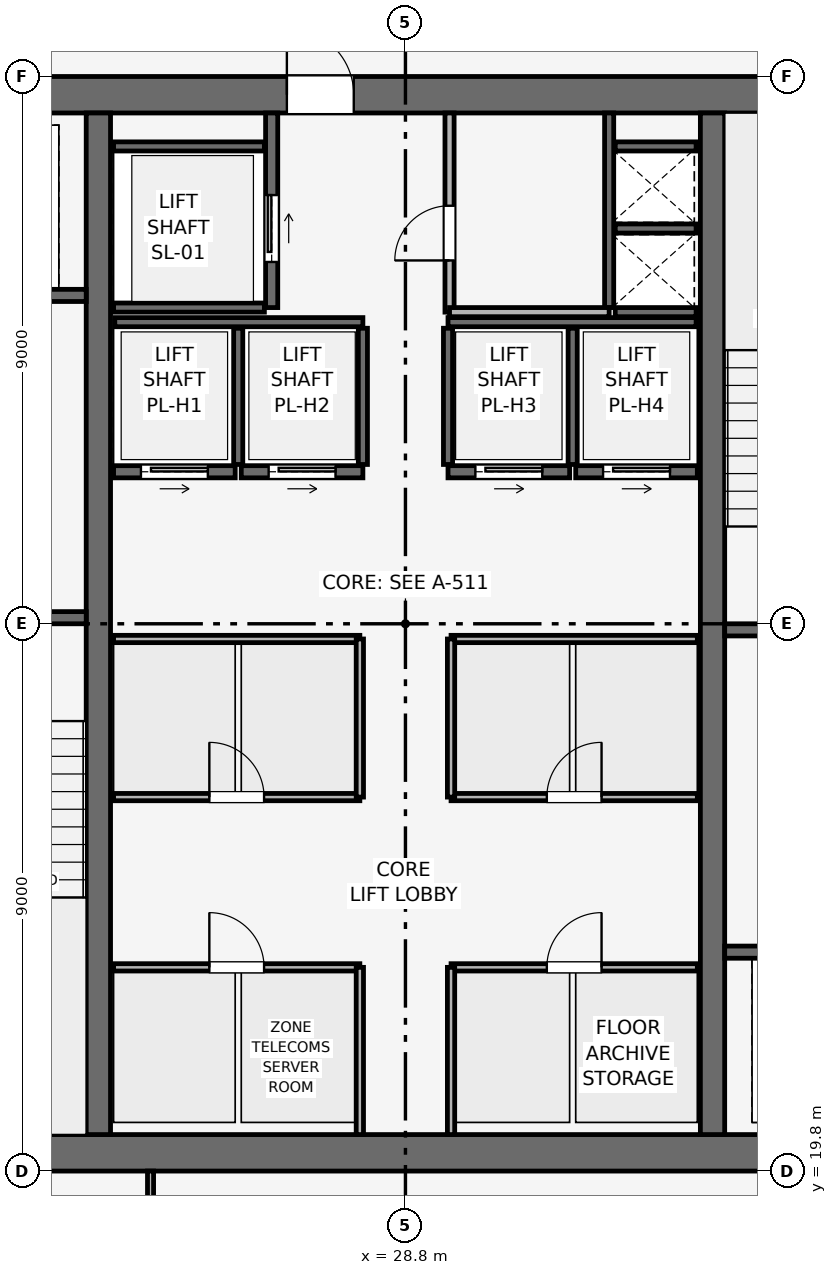
"""IFC4 building model, lengths in metres.
Left out: names, types, materials, properties, quantities, classifications, styles, units other than length and angle.
Written with IfcOpenShell. Run it as: python <this file> out.ifc"""

import sys

from ifc_helpers import new_model, si_unit, direction, frame, frame_2d, origin, place, context, subcontext, project, spatial, rectangle, extrude, element, fill, save


model = new_model("IFC4")
c1 = context("Model", 3, precision=1e-05, world=origin(), true_north=direction((0.0, 1.0)))
c2 = subcontext(c1, "Body", "Model", "MODEL_VIEW")
j1 = project(units=[si_unit("LENGTHUNIT", "METRE"), si_unit("PLANEANGLEUNIT", "RADIAN")], contexts=[c1])
p1 = place(None, origin())
s1 = spatial("IfcSite", under=j1, at=p1, CompositionType="ELEMENT")
p2 = place(p1, origin())
s2 = spatial("IfcBuilding", under=s1, at=p2, CompositionType="ELEMENT")
p3 = place(p2, frame((0.0, 0.0, 299.25)))
s3 = spatial("IfcBuildingStorey", under=s2, at=p3, CompositionType="ELEMENT", Elevation=299.25)
p4 = place(p3, frame((19.8, 20.1, 0.0), z_axis=(0.0, 0.0, 1.0), x_axis=(1.0, 0.0, 0.0)))
e1 = element("IfcWall", 1, at=p4, inside=s3, PredefinedType="SHEAR", context=c2, shape_type="SweptSolid", body=[
    extrude(rectangle(XDim=18.0, YDim=0.6, at=frame_2d((9.0, 0.0))), origin(), (0.0, 0.0, 1.0), 3.75),
])
p5 = place(p3, frame((19.8, 37.5, 0.0), z_axis=(0.0, 0.0, 1.0), x_axis=(1.0, 0.0, 0.0)))
e2 = element("IfcWall", 2, at=p5, inside=s3, PredefinedType="SHEAR", context=c2, shape_type="SweptSolid", body=[
    extrude(rectangle(XDim=18.0, YDim=0.6, at=frame_2d((9.0, 0.0))), origin(), (0.0, 0.0, 1.0), 3.75),
])
p6 = place(p5, frame((7.05, 0.0, 0.0)))
e3 = element("IfcOpeningElement", 3, at=p6, cuts=e2, PredefinedType="OPENING", context=c2, shape_type="SweptSolid", body=[
    extrude(rectangle(XDim=1.1, YDim=2.15, at=frame_2d((0.55, 1.075))), frame((0.0, 0.31, 0.0), z_axis=(0.0, -1.0, 0.0), x_axis=(1.0, 0.0, 0.0)), (0.0, 0.0, 1.0), 0.62),
])
for number, where, z_axis, x_axis in (
    (4, (23.75, 20.4, 0.0), (0.0, 0.0, 1.0), (0.0, 1.0, 0.0)),
    (5, (33.85, 20.4, 0.0), (0.0, 0.0, 1.0), (0.0, 1.0, 0.0)),
):
    element("IfcWall", number, at=place(p3, frame(where, z_axis=z_axis, x_axis=x_axis)), inside=s3, PredefinedType="SHEAR", context=c2, shape_type="SweptSolid", body=[
        extrude(rectangle(XDim=16.8, YDim=0.4, at=frame_2d((8.4, 0.0))), origin(), (0.0, 0.0, 1.0), 3.75),
    ])
p7 = place(p3, frame((20.4, 28.9, 0.0), z_axis=(0.0, 0.0, 1.0), x_axis=(1.0, 0.0, 0.0)))
e6 = element("IfcWall", 6, at=p7, inside=s3, PredefinedType="SHEAR", context=c2, shape_type="SweptSolid", body=[
    extrude(rectangle(XDim=3.15, YDim=0.2, at=frame_2d((1.575, 0.0))), origin(), (0.0, 0.0, 1.0), 3.51),
])
p8 = place(p7, frame((0.8, 0.0, 0.0)))
e7 = element("IfcOpeningElement", 7, at=p8, cuts=e6, PredefinedType="OPENING", context=c2, shape_type="SweptSolid", body=[
    extrude(rectangle(XDim=1.0, YDim=2.1, at=frame_2d((0.5, 1.05))), frame((0.0, 0.11, 0.0), z_axis=(0.0, -1.0, 0.0), x_axis=(1.0, 0.0, 0.0)), (0.0, 0.0, 1.0), 0.22),
])
p9 = place(p3, frame((34.05, 28.7, 0.0), z_axis=(0.0, 0.0, 1.0), x_axis=(1.0, 0.0, 0.0)))
e8 = element("IfcWall", 8, at=p9, inside=s3, PredefinedType="SHEAR", context=c2, shape_type="SweptSolid", body=[
    extrude(rectangle(XDim=3.15, YDim=0.2, at=frame_2d((1.575, 0.0))), origin(), (0.0, 0.0, 1.0), 3.51),
])
p10 = place(p9, frame((0.8, 0.0, 0.0)))
e9 = element("IfcOpeningElement", 9, at=p10, cuts=e8, PredefinedType="OPENING", context=c2, shape_type="SweptSolid", body=[
    extrude(rectangle(XDim=1.0, YDim=2.1, at=frame_2d((0.5, 1.05))), frame((0.0, 0.11, 0.0), z_axis=(0.0, -1.0, 0.0), x_axis=(1.0, 0.0, 0.0)), (0.0, 0.0, 1.0), 0.22),
])
p11 = place(p3, frame((32.15, 34.0, 0.0), z_axis=(0.0, 0.0, 1.0), x_axis=(0.0, 1.0, 0.0)))
e10 = element("IfcWall", 10, at=p11, inside=s3, PredefinedType="SHEAR", context=c2, shape_type="SweptSolid", body=[
    extrude(rectangle(XDim=3.2, YDim=0.15, at=frame_2d((1.6, 0.0))), origin(), (0.0, 0.0, 1.0), 3.51),
])
for number, where, z_axis, x_axis in (
    (11, (32.25, 33.925, 0.0), (0.0, 0.0, 1.0), (1.0, 0.0, 0.0)),
    (12, (32.25, 35.3, 0.0), (0.0, 0.0, 1.0), (1.0, 0.0, 0.0)),
):
    element("IfcWall", number, at=place(p3, frame(where, z_axis=z_axis, x_axis=x_axis)), inside=s3, PredefinedType="SHEAR", context=c2, shape_type="SweptSolid", body=[
        extrude(rectangle(XDim=1.33, YDim=0.15, at=frame_2d((0.665, 0.0))), origin(), (0.0, 0.0, 1.0), 3.51),
    ])
p12 = place(p3, frame((20.5, 34.2, 0.0), z_axis=(0.0, 0.0, 1.0), x_axis=(1.0, 0.0, 0.0)))
e13 = element("IfcWall", 13, at=p12, inside=s3, PredefinedType="SHEAR", context=c2, shape_type="SweptSolid", body=[
    extrude(rectangle(XDim=3.05, YDim=0.2, at=frame_2d((1.525, 0.0))), origin(), (0.0, 0.0, 1.0), 3.51),
])
p13 = place(p12, frame((0.75, 0.0, 0.0)))
e14 = element("IfcOpeningElement", 14, at=p13, cuts=e13, PredefinedType="OPENING", context=c2, shape_type="SweptSolid", body=[
    extrude(rectangle(XDim=1.1, YDim=2.15, at=frame_2d((0.55, 1.075))), frame((0.0, 0.11, 0.0), z_axis=(0.0, -1.0, 0.0), x_axis=(1.0, 0.0, 0.0)), (0.0, 0.0, 1.0), 0.22),
])
p14 = place(p3, frame((34.05, 23.4, 0.0), z_axis=(0.0, 0.0, 1.0), x_axis=(1.0, 0.0, 0.0)))
e15 = element("IfcWall", 15, at=p14, inside=s3, PredefinedType="SHEAR", context=c2, shape_type="SweptSolid", body=[
    extrude(rectangle(XDim=3.05, YDim=0.2, at=frame_2d((1.525, 0.0))), origin(), (0.0, 0.0, 1.0), 3.51),
])
p15 = place(p14, frame((1.2, 0.0, 0.0)))
e16 = element("IfcOpeningElement", 16, at=p15, cuts=e15, PredefinedType="OPENING", context=c2, shape_type="SweptSolid", body=[
    extrude(rectangle(XDim=1.1, YDim=2.15, at=frame_2d((0.55, 1.075))), frame((0.0, 0.11, 0.0), z_axis=(0.0, -1.0, 0.0), x_axis=(1.0, 0.0, 0.0)), (0.0, 0.0, 1.0), 0.22),
])
p16 = place(p3, frame((26.6, 34.0, 0.0), z_axis=(0.0, 0.0, 1.0), x_axis=(0.0, 1.0, 0.0)))
e17 = element("IfcWall", 17, at=p16, inside=s3, PredefinedType="SHEAR", context=c2, shape_type="SweptSolid", body=[
    extrude(rectangle(XDim=3.2, YDim=0.2, at=frame_2d((1.6, 0.0))), origin(), (0.0, 0.0, 1.0), 3.51),
])
p17 = place(p16, frame((0.75, 0.0, 0.0)))
e18 = element("IfcOpeningElement", 18, at=p17, cuts=e17, PredefinedType="OPENING", context=c2, shape_type="SweptSolid", body=[
    extrude(rectangle(XDim=1.1, YDim=2.15, at=frame_2d((0.55, 1.075))), frame((0.0, 0.11, 0.0), z_axis=(0.0, -1.0, 0.0), x_axis=(1.0, 0.0, 0.0)), (0.0, 0.0, 1.0), 0.22),
])
for number, where, z_axis, x_axis in (
    (19, (24.0, 34.0, 0.0), (0.0, 0.0, 1.0), (1.0, 0.0, 0.0)),
    (20, (24.0, 36.65, 0.0), (0.0, 0.0, 1.0), (1.0, 0.0, 0.0)),
):
    element("IfcWall", number, at=place(p3, frame(where, z_axis=z_axis, x_axis=x_axis)), inside=s3, PredefinedType="SHEAR", context=c2, shape_type="SweptSolid", body=[
        extrude(rectangle(XDim=2.48, YDim=0.15, at=frame_2d((1.24, 0.0))), origin(), (0.0, 0.0, 1.0), 3.51),
    ])
p18 = place(p3, frame((24.0, 31.3, 0.0), z_axis=(0.0, 0.0, 1.0), x_axis=(1.0, 0.0, 0.0)))
e21 = element("IfcWall", 21, at=p18, inside=s3, PredefinedType="SHEAR", context=c2, shape_type="SweptSolid", body=[
    extrude(rectangle(XDim=2.0, YDim=0.2, at=frame_2d((1.0, 0.0))), origin(), (0.0, 0.0, 1.0), 3.51),
])
p19 = place(p18, frame((0.45, 0.0, 0.0)))
e22 = element("IfcOpeningElement", 22, at=p19, cuts=e21, PredefinedType="OPENING", context=c2, shape_type="SweptSolid", body=[
    extrude(rectangle(XDim=1.1, YDim=2.15, at=frame_2d((0.55, 1.075))), frame((0.0, 0.11, 0.0), z_axis=(0.0, -1.0, 0.0), x_axis=(1.0, 0.0, 0.0)), (0.0, 0.0, 1.0), 0.22),
])
p20 = place(p3, frame((26.1, 31.3, 0.0), z_axis=(0.0, 0.0, 1.0), x_axis=(1.0, 0.0, 0.0)))
e23 = element("IfcWall", 23, at=p20, inside=s3, PredefinedType="SHEAR", context=c2, shape_type="SweptSolid", body=[
    extrude(rectangle(XDim=2.0, YDim=0.2, at=frame_2d((1.0, 0.0))), origin(), (0.0, 0.0, 1.0), 3.51),
])
p21 = place(p20, frame((0.45, 0.0, 0.0)))
e24 = element("IfcOpeningElement", 24, at=p21, cuts=e23, PredefinedType="OPENING", context=c2, shape_type="SweptSolid", body=[
    extrude(rectangle(XDim=1.1, YDim=2.15, at=frame_2d((0.55, 1.075))), frame((0.0, 0.11, 0.0), z_axis=(0.0, -1.0, 0.0), x_axis=(1.0, 0.0, 0.0)), (0.0, 0.0, 1.0), 0.22),
])
p22 = place(p3, frame((29.5, 31.3, 0.0), z_axis=(0.0, 0.0, 1.0), x_axis=(1.0, 0.0, 0.0)))
e25 = element("IfcWall", 25, at=p22, inside=s3, PredefinedType="SHEAR", context=c2, shape_type="SweptSolid", body=[
    extrude(rectangle(XDim=2.0, YDim=0.2, at=frame_2d((1.0, 0.0))), origin(), (0.0, 0.0, 1.0), 3.51),
])
p23 = place(p22, frame((0.45, 0.0, 0.0)))
e26 = element("IfcOpeningElement", 26, at=p23, cuts=e25, PredefinedType="OPENING", context=c2, shape_type="SweptSolid", body=[
    extrude(rectangle(XDim=1.1, YDim=2.15, at=frame_2d((0.55, 1.075))), frame((0.0, 0.11, 0.0), z_axis=(0.0, -1.0, 0.0), x_axis=(1.0, 0.0, 0.0)), (0.0, 0.0, 1.0), 0.22),
])
p24 = place(p3, frame((31.6, 31.3, 0.0), z_axis=(0.0, 0.0, 1.0), x_axis=(1.0, 0.0, 0.0)))
e27 = element("IfcWall", 27, at=p24, inside=s3, PredefinedType="SHEAR", context=c2, shape_type="SweptSolid", body=[
    extrude(rectangle(XDim=2.0, YDim=0.2, at=frame_2d((1.0, 0.0))), origin(), (0.0, 0.0, 1.0), 3.51),
])
p25 = place(p24, frame((0.45, 0.0, 0.0)))
e28 = element("IfcOpeningElement", 28, at=p25, cuts=e27, PredefinedType="OPENING", context=c2, shape_type="SweptSolid", body=[
    extrude(rectangle(XDim=1.1, YDim=2.15, at=frame_2d((0.55, 1.075))), frame((0.0, 0.11, 0.0), z_axis=(0.0, -1.0, 0.0), x_axis=(1.0, 0.0, 0.0)), (0.0, 0.0, 1.0), 0.22),
])
p26 = place(p3, frame((32.25, 36.65, 0.0), z_axis=(0.0, 0.0, 1.0), x_axis=(1.0, 0.0, 0.0)))
e29 = element("IfcWall", 29, at=p26, inside=s3, PredefinedType="SHEAR", context=c2, shape_type="SweptSolid", body=[
    extrude(rectangle(XDim=1.33, YDim=0.15, at=frame_2d((0.665, 0.0))), origin(), (0.0, 0.0, 1.0), 3.51),
])
for number, where, z_axis, x_axis in (
    (30, (24.02, 33.76, 0.0), (0.0, 0.0, 1.0), (1.0, 0.0, 0.0)),
    (31, (29.5, 33.76, 0.0), (0.0, 0.0, 1.0), (1.0, 0.0, 0.0)),
):
    element("IfcWall", number, at=place(p3, frame(where, z_axis=z_axis, x_axis=x_axis)), inside=s3, PredefinedType="SHEAR", context=c2, shape_type="SweptSolid", body=[
        extrude(rectangle(XDim=4.08, YDim=0.15, at=frame_2d((2.04, 0.0))), origin(), (0.0, 0.0, 1.0), 3.51),
    ])
for number, where, z_axis, x_axis in (
    (32, (26.05, 31.42, 0.0), (0.0, 0.0, 1.0), (0.0, 1.0, 0.0)),
    (33, (28.1, 31.42, 0.0), (0.0, 0.0, 1.0), (0.0, 1.0, 0.0)),
    (34, (29.5, 31.42, 0.0), (0.0, 0.0, 1.0), (0.0, 1.0, 0.0)),
    (35, (31.55, 31.42, 0.0), (0.0, 0.0, 1.0), (0.0, 1.0, 0.0)),
):
    element("IfcWall", number, at=place(p3, frame(where, z_axis=z_axis, x_axis=x_axis)), inside=s3, PredefinedType="SHEAR", context=c2, shape_type="SweptSolid", body=[
        extrude(rectangle(XDim=2.24, YDim=0.15, at=frame_2d((1.12, 0.0))), origin(), (0.0, 0.0, 1.0), 3.51),
    ])
p27 = place(p3, frame((29.525, 33.925, 0.0), z_axis=(0.0, 0.0, 1.0), x_axis=(0.0, 1.0, 0.0)))
e36 = element("IfcWall", 36, at=p27, inside=s3, PredefinedType="PARTITIONING", context=c2, shape_type="SweptSolid", body=[
    extrude(rectangle(XDim=3.275, YDim=0.15, at=frame_2d((1.637, 0.0))), origin(), (0.0, 0.0, 1.0), 3.51),
])
p28 = place(p27, frame((0.85, 0.0, 0.0)))
e37 = element("IfcOpeningElement", 37, at=p28, cuts=e36, PredefinedType="OPENING", context=c2, shape_type="SweptSolid", body=[
    extrude(rectangle(XDim=0.9, YDim=2.1, at=frame_2d((0.45, 1.05))), frame((0.0, 0.085, 0.0), z_axis=(0.0, -1.0, 0.0), x_axis=(1.0, 0.0, 0.0)), (0.0, 0.0, 1.0), 0.17),
])
p29 = place(p3, frame((29.525, 33.925, 0.0), z_axis=(0.0, 0.0, 1.0), x_axis=(1.0, 0.0, 0.0)))
e38 = element("IfcWall", 38, at=p29, inside=s3, PredefinedType="PARTITIONING", context=c2, shape_type="SweptSolid", body=[
    extrude(rectangle(XDim=2.625, YDim=0.15, at=frame_2d((1.312, 0.0))), origin(), (0.0, 0.0, 1.0), 3.51),
])
p30 = place(p3, frame((24.0, 23.15, 0.0), z_axis=(0.0, 0.0, 1.0), x_axis=(1.0, 0.0, 0.0)))
e39 = element("IfcWall", 39, at=p30, inside=s3, PredefinedType="PARTITIONING", context=c2, shape_type="SweptSolid", body=[
    extrude(rectangle(XDim=4.05, YDim=0.12, at=frame_2d((2.025, 0.0))), origin(), (0.0, 0.0, 1.0), 3.51),
])
p31 = place(p30, frame((1.575, 0.0, 0.0)))
e40 = element("IfcOpeningElement", 40, at=p31, cuts=e39, PredefinedType="OPENING", context=c2, shape_type="SweptSolid", body=[
    extrude(rectangle(XDim=0.9, YDim=2.1, at=frame_2d((0.45, 1.05))), frame((0.0, 0.07, 0.0), z_axis=(0.0, -1.0, 0.0), x_axis=(1.0, 0.0, 0.0)), (0.0, 0.0, 1.0), 0.14),
])
p32 = place(p3, frame((28.05, 20.4, 0.0), z_axis=(0.0, 0.0, 1.0), x_axis=(0.0, 1.0, 0.0)))
e41 = element("IfcWall", 41, at=p32, inside=s3, PredefinedType="PARTITIONING", context=c2, shape_type="SweptSolid", body=[
    extrude(rectangle(XDim=2.75, YDim=0.12, at=frame_2d((1.375, 0.0))), origin(), (0.0, 0.0, 1.0), 3.51),
])
p33 = place(p3, frame((29.55, 23.15, 0.0), z_axis=(0.0, 0.0, 1.0), x_axis=(1.0, 0.0, 0.0)))
e42 = element("IfcWall", 42, at=p33, inside=s3, PredefinedType="PARTITIONING", context=c2, shape_type="SweptSolid", body=[
    extrude(rectangle(XDim=4.05, YDim=0.12, at=frame_2d((2.025, 0.0))), origin(), (0.0, 0.0, 1.0), 3.51),
])
p34 = place(p33, frame((1.575, 0.0, 0.0)))
e43 = element("IfcOpeningElement", 43, at=p34, cuts=e42, PredefinedType="OPENING", context=c2, shape_type="SweptSolid", body=[
    extrude(rectangle(XDim=0.9, YDim=2.1, at=frame_2d((0.45, 1.05))), frame((0.0, 0.07, 0.0), z_axis=(0.0, -1.0, 0.0), x_axis=(1.0, 0.0, 0.0)), (0.0, 0.0, 1.0), 0.14),
])
p35 = place(p3, frame((29.55, 20.4, 0.0), z_axis=(0.0, 0.0, 1.0), x_axis=(0.0, 1.0, 0.0)))
e44 = element("IfcWall", 44, at=p35, inside=s3, PredefinedType="PARTITIONING", context=c2, shape_type="SweptSolid", body=[
    extrude(rectangle(XDim=2.75, YDim=0.12, at=frame_2d((1.375, 0.0))), origin(), (0.0, 0.0, 1.0), 3.51),
])
p36 = place(p3, frame((24.0, 25.95, 0.0), z_axis=(0.0, 0.0, 1.0), x_axis=(1.0, 0.0, 0.0)))
e45 = element("IfcWall", 45, at=p36, inside=s3, PredefinedType="PARTITIONING", context=c2, shape_type="SweptSolid", body=[
    extrude(rectangle(XDim=4.05, YDim=0.12, at=frame_2d((2.025, 0.0))), origin(), (0.0, 0.0, 1.0), 3.51),
])
p37 = place(p36, frame((1.575, 0.0, 0.0)))
e46 = element("IfcOpeningElement", 46, at=p37, cuts=e45, PredefinedType="OPENING", context=c2, shape_type="SweptSolid", body=[
    extrude(rectangle(XDim=0.9, YDim=2.1, at=frame_2d((0.45, 1.05))), frame((0.0, 0.07, 0.0), z_axis=(0.0, -1.0, 0.0), x_axis=(1.0, 0.0, 0.0)), (0.0, 0.0, 1.0), 0.14),
])
p38 = place(p3, frame((24.0, 28.55, 0.0), z_axis=(0.0, 0.0, 1.0), x_axis=(1.0, 0.0, 0.0)))
e47 = element("IfcWall", 47, at=p38, inside=s3, PredefinedType="PARTITIONING", context=c2, shape_type="SweptSolid", body=[
    extrude(rectangle(XDim=4.05, YDim=0.12, at=frame_2d((2.025, 0.0))), origin(), (0.0, 0.0, 1.0), 3.51),
])
p39 = place(p3, frame((28.05, 25.95, 0.0), z_axis=(0.0, 0.0, 1.0), x_axis=(0.0, 1.0, 0.0)))
e48 = element("IfcWall", 48, at=p39, inside=s3, PredefinedType="PARTITIONING", context=c2, shape_type="SweptSolid", body=[
    extrude(rectangle(XDim=2.6, YDim=0.12, at=frame_2d((1.3, 0.0))), origin(), (0.0, 0.0, 1.0), 3.51),
])
p40 = place(p3, frame((29.55, 25.95, 0.0), z_axis=(0.0, 0.0, 1.0), x_axis=(1.0, 0.0, 0.0)))
e49 = element("IfcWall", 49, at=p40, inside=s3, PredefinedType="PARTITIONING", context=c2, shape_type="SweptSolid", body=[
    extrude(rectangle(XDim=4.05, YDim=0.12, at=frame_2d((2.025, 0.0))), origin(), (0.0, 0.0, 1.0), 3.51),
])
p41 = place(p40, frame((1.575, 0.0, 0.0)))
e50 = element("IfcOpeningElement", 50, at=p41, cuts=e49, PredefinedType="OPENING", context=c2, shape_type="SweptSolid", body=[
    extrude(rectangle(XDim=0.9, YDim=2.1, at=frame_2d((0.45, 1.05))), frame((0.0, 0.07, 0.0), z_axis=(0.0, -1.0, 0.0), x_axis=(1.0, 0.0, 0.0)), (0.0, 0.0, 1.0), 0.14),
])
p42 = place(p3, frame((29.55, 28.55, 0.0), z_axis=(0.0, 0.0, 1.0), x_axis=(1.0, 0.0, 0.0)))
e51 = element("IfcWall", 51, at=p42, inside=s3, PredefinedType="PARTITIONING", context=c2, shape_type="SweptSolid", body=[
    extrude(rectangle(XDim=4.05, YDim=0.12, at=frame_2d((2.025, 0.0))), origin(), (0.0, 0.0, 1.0), 3.51),
])
p43 = place(p3, frame((29.55, 25.95, 0.0), z_axis=(0.0, 0.0, 1.0), x_axis=(0.0, 1.0, 0.0)))
e52 = element("IfcWall", 52, at=p43, inside=s3, PredefinedType="PARTITIONING", context=c2, shape_type="SweptSolid", body=[
    extrude(rectangle(XDim=2.6, YDim=0.12, at=frame_2d((1.3, 0.0))), origin(), (0.0, 0.0, 1.0), 3.51),
])
p44 = place(p3, frame((24.608, 6.13, 0.0), z_axis=(0.0, 0.0, 1.0), x_axis=(0.0, 1.0, 0.0)))
e53 = element("IfcWall", 53, at=p44, inside=s3, PredefinedType="MOVABLE", context=c2, shape_type="SweptSolid", body=[
    extrude(rectangle(XDim=13.67, YDim=0.1, at=frame_2d((6.835, 0.0))), origin(), (0.0, 0.0, 1.0), 3.135),
])
p45 = place(p44, frame((11.27, 0.0, 0.0)))
e54 = element("IfcOpeningElement", 54, at=p45, cuts=e53, PredefinedType="OPENING", context=c2, shape_type="SweptSolid", body=[
    extrude(rectangle(XDim=0.9, YDim=2.1, at=frame_2d((0.45, 1.05))), frame((0.0, 0.06, 0.0), z_axis=(0.0, -1.0, 0.0), x_axis=(1.0, 0.0, 0.0)), (0.0, 0.0, 1.0), 0.12),
])
p46 = place(p17, origin())
e55 = element("IfcDoor", 55, at=p46, inside=s3, OperationType="SLIDING_TO_RIGHT", PredefinedType="DOOR", context=c2, shape_type="SweptSolid", body=[
    extrude(rectangle(XDim=1.1, YDim=2.15, at=frame_2d((0.55, 1.075))), frame((0.0, 0.025, 0.0), z_axis=(0.0, -1.0, 0.0), x_axis=(1.0, 0.0, 0.0)), (0.0, 0.0, 1.0), 0.05),
])
fill(e18, e55)
p47 = place(p19, origin())
e56 = element("IfcDoor", 56, at=p47, inside=s3, OperationType="SLIDING_TO_RIGHT", PredefinedType="DOOR", context=c2, shape_type="SweptSolid", body=[
    extrude(rectangle(XDim=1.1, YDim=2.15, at=frame_2d((0.55, 1.075))), frame((0.0, 0.025, 0.0), z_axis=(0.0, -1.0, 0.0), x_axis=(1.0, 0.0, 0.0)), (0.0, 0.0, 1.0), 0.05),
])
fill(e22, e56)
p48 = place(p21, origin())
e57 = element("IfcDoor", 57, at=p48, inside=s3, OperationType="SLIDING_TO_RIGHT", PredefinedType="DOOR", context=c2, shape_type="SweptSolid", body=[
    extrude(rectangle(XDim=1.1, YDim=2.15, at=frame_2d((0.55, 1.075))), frame((0.0, 0.025, 0.0), z_axis=(0.0, -1.0, 0.0), x_axis=(1.0, 0.0, 0.0)), (0.0, 0.0, 1.0), 0.05),
])
fill(e24, e57)
p49 = place(p23, origin())
e58 = element("IfcDoor", 58, at=p49, inside=s3, OperationType="SLIDING_TO_RIGHT", PredefinedType="DOOR", context=c2, shape_type="SweptSolid", body=[
    extrude(rectangle(XDim=1.1, YDim=2.15, at=frame_2d((0.55, 1.075))), frame((0.0, 0.025, 0.0), z_axis=(0.0, -1.0, 0.0), x_axis=(1.0, 0.0, 0.0)), (0.0, 0.0, 1.0), 0.05),
])
fill(e26, e58)
p50 = place(p25, origin())
e59 = element("IfcDoor", 59, at=p50, inside=s3, OperationType="SLIDING_TO_RIGHT", PredefinedType="DOOR", context=c2, shape_type="SweptSolid", body=[
    extrude(rectangle(XDim=1.1, YDim=2.15, at=frame_2d((0.55, 1.075))), frame((0.0, 0.025, 0.0), z_axis=(0.0, -1.0, 0.0), x_axis=(1.0, 0.0, 0.0)), (0.0, 0.0, 1.0), 0.05),
])
fill(e28, e59)
p51 = place(p28, origin())
e60 = element("IfcDoor", 60, at=p51, inside=s3, OperationType="SINGLE_SWING_LEFT", PredefinedType="DOOR", context=c2, shape_type="SweptSolid", body=[
    extrude(rectangle(XDim=0.9, YDim=2.1, at=frame_2d((0.45, 1.05))), frame((0.0, 0.025, 0.0), z_axis=(0.0, -1.0, 0.0), x_axis=(1.0, 0.0, 0.0)), (0.0, 0.0, 1.0), 0.05),
])
fill(e37, e60)
p52 = place(p31, origin())
e61 = element("IfcDoor", 61, at=p52, inside=s3, OperationType="SINGLE_SWING_LEFT", PredefinedType="DOOR", context=c2, shape_type="SweptSolid", body=[
    extrude(rectangle(XDim=0.9, YDim=2.1, at=frame_2d((0.45, 1.05))), frame((0.0, 0.025, 0.0), z_axis=(0.0, -1.0, 0.0), x_axis=(1.0, 0.0, 0.0)), (0.0, 0.0, 1.0), 0.05),
])
fill(e40, e61)
p53 = place(p34, origin())
e62 = element("IfcDoor", 62, at=p53, inside=s3, OperationType="SINGLE_SWING_RIGHT", PredefinedType="DOOR", context=c2, shape_type="SweptSolid", body=[
    extrude(rectangle(XDim=0.9, YDim=2.1, at=frame_2d((0.45, 1.05))), frame((0.0, 0.025, 0.0), z_axis=(0.0, -1.0, 0.0), x_axis=(1.0, 0.0, 0.0)), (0.0, 0.0, 1.0), 0.05),
])
fill(e43, e62)
p54 = place(p37, origin())
e63 = element("IfcDoor", 63, at=p54, inside=s3, OperationType="SINGLE_SWING_LEFT", PredefinedType="DOOR", context=c2, shape_type="SweptSolid", body=[
    extrude(rectangle(XDim=0.9, YDim=2.1, at=frame_2d((0.45, 1.05))), frame((0.0, 0.025, 0.0), z_axis=(0.0, -1.0, 0.0), x_axis=(1.0, 0.0, 0.0)), (0.0, 0.0, 1.0), 0.05),
])
fill(e46, e63)
p55 = place(p41, origin())
e64 = element("IfcDoor", 64, at=p55, inside=s3, OperationType="SINGLE_SWING_RIGHT", PredefinedType="DOOR", context=c2, shape_type="SweptSolid", body=[
    extrude(rectangle(XDim=0.9, YDim=2.1, at=frame_2d((0.45, 1.05))), frame((0.0, 0.025, 0.0), z_axis=(0.0, -1.0, 0.0), x_axis=(1.0, 0.0, 0.0)), (0.0, 0.0, 1.0), 0.05),
])
fill(e50, e64)
p56 = place(p6, origin())
e65 = element("IfcDoor", 65, at=p56, inside=s3, OperationType="SINGLE_SWING_LEFT", PredefinedType="DOOR", context=c2, shape_type="SweptSolid", body=[
    extrude(rectangle(XDim=1.1, YDim=2.15, at=frame_2d((0.55, 1.075))), frame((0.0, 0.025, 0.0), z_axis=(0.0, -1.0, 0.0), x_axis=(1.0, 0.0, 0.0)), (0.0, 0.0, 1.0), 0.05),
])
fill(e3, e65)
save(model, sys.argv[1])
